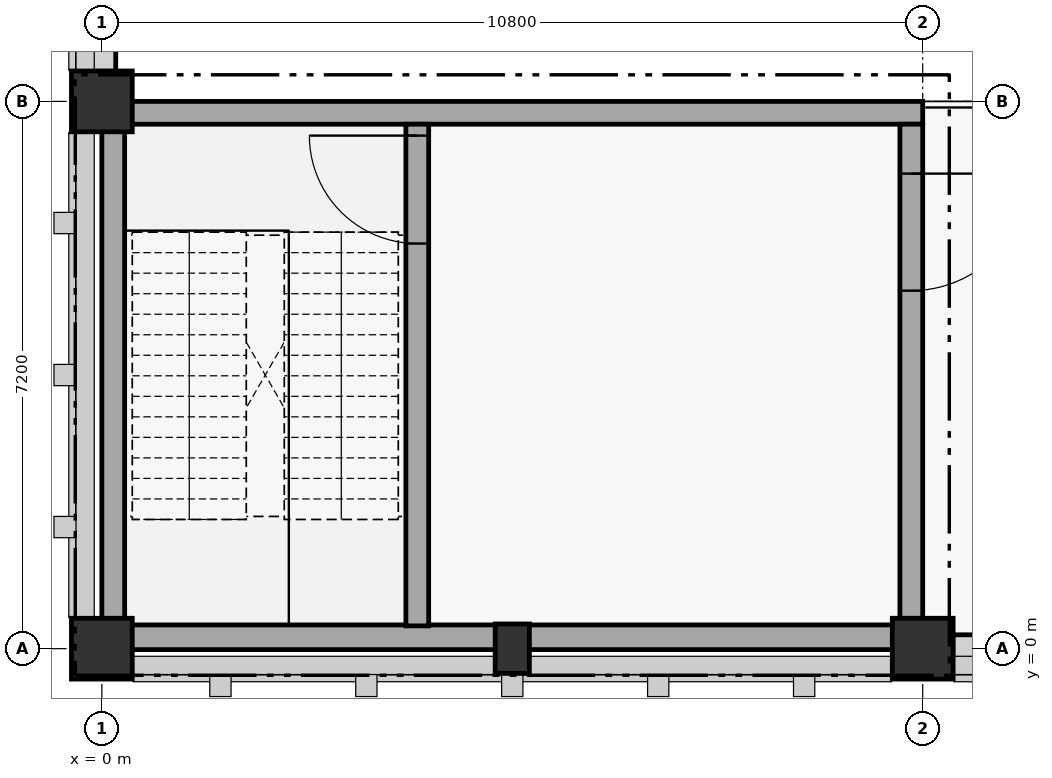
"""IFC4 building model, lengths in metres.
Left out: names, types, materials, properties, quantities, classifications, styles, units other than length and angle.
Written with IfcOpenShell. Run it as: python <this file> out.ifc"""

import sys

from ifc_helpers import new_model, si_unit, direction, frame, frame_2d, origin, origin_with_axes, origin_2d, place, context, subcontext, project, spatial, rectangle, extrude, element, fill, save


model = new_model("IFC4")
c1 = context("Model", 3, precision=1e-05, world=origin(), true_north=direction((0.0, 1.0)))
c2 = subcontext(c1, "Body", "Model", "MODEL_VIEW")
j1 = project(units=[si_unit("LENGTHUNIT", "METRE"), si_unit("PLANEANGLEUNIT", "RADIAN")], contexts=[c1])
p1 = place(None, origin())
s1 = spatial("IfcSite", under=j1, at=p1, CompositionType="ELEMENT")
p2 = place(p1, origin())
s2 = spatial("IfcBuilding", under=s1, at=p2, CompositionType="ELEMENT")
p3 = place(p2, frame((0.0, 0.0, 10.8)))
s3 = spatial("IfcBuildingStorey", under=s2, at=p3, CompositionType="ELEMENT", Elevation=10.8)
p4 = place(p3, origin_with_axes())
e1 = element("IfcColumn", 1, at=p4, inside=s3, PredefinedType="COLUMN", context=c2, shape_type="SweptSolid", body=[
    extrude(rectangle(XDim=0.8, YDim=0.8, at=origin_2d()), origin(), (0.0, 0.0, 1.0), 1.43),
])
for number, where, z_axis, x_axis in (
    (2, (0.0, 7.2, 0.0), (0.0, 0.0, 1.0), (1.0, 0.0, 0.0)),
    (3, (10.8, 0.0, 0.0), (0.0, 0.0, 1.0), (1.0, 0.0, 0.0)),
):
    element("IfcColumn", number, at=place(p3, frame(where, z_axis=z_axis, x_axis=x_axis)), inside=s3, PredefinedType="COLUMN", context=c2, shape_type="SweptSolid", body=[
        extrude(rectangle(XDim=0.8, YDim=0.8, at=origin_2d()), origin(), (0.0, 0.0, 1.0), 4.2),
    ])
p5 = place(p3, frame((5.4, 0.0, 0.0), z_axis=(0.0, 0.0, 1.0), x_axis=(1.0, 0.0, 0.0)))
e4 = element("IfcColumn", 4, at=p5, inside=s3, PredefinedType="PILASTER", context=c2, shape_type="SweptSolid", body=[
    extrude(rectangle(XDim=0.45, YDim=0.65, at=origin_2d()), origin(), (0.0, 0.0, 1.0), 2.72),
])
p6 = place(p3, frame((10.8, 0.15, 0.0), z_axis=(0.0, 0.0, 1.0), x_axis=(-1.0, 0.0, 0.0)))
e5 = element("IfcWall", 5, at=p6, inside=s3, PredefinedType="SHEAR", context=c2, shape_type="SweptSolid", body=[
    extrude(rectangle(XDim=10.8, YDim=0.325, at=frame_2d((5.4, 0.0))), origin(), (0.0, 0.0, 1.0), 4.2),
])
p7 = place(p3, frame((0.0, 7.05, 0.0), z_axis=(0.0, 0.0, 1.0), x_axis=(1.0, 0.0, 0.0)))
e6 = element("IfcWall", 6, at=p7, inside=s3, PredefinedType="SHEAR", context=c2, shape_type="SweptSolid", body=[
    extrude(rectangle(XDim=10.8, YDim=0.3, at=frame_2d((5.4, 0.0))), origin(), (0.0, 0.0, 1.0), 4.2),
])
p8 = place(p3, frame((0.15, 0.3, 0.0), z_axis=(0.0, 0.0, 1.0), x_axis=(0.0, 1.0, 0.0)))
e7 = element("IfcWall", 7, at=p8, inside=s3, PredefinedType="SHEAR", context=c2, shape_type="SweptSolid", body=[
    extrude(rectangle(XDim=6.6, YDim=0.3, at=frame_2d((3.3, 0.0))), origin(), (0.0, 0.0, 1.0), 4.2),
])
p9 = place(p3, frame((10.65, 6.9, 0.0), z_axis=(0.0, 0.0, 1.0), x_axis=(0.0, -1.0, 0.0)))
e8 = element("IfcWall", 8, at=p9, inside=s3, PredefinedType="SHEAR", context=c2, shape_type="SweptSolid", body=[
    extrude(rectangle(XDim=6.6, YDim=0.3, at=frame_2d((3.3, 0.0))), origin(), (0.0, 0.0, 1.0), 4.2),
])
p10 = place(p9, frame((0.65, 0.0, 0.0)))
e9 = element("IfcOpeningElement", 9, at=p10, cuts=e8, PredefinedType="OPENING", context=c2, shape_type="SweptSolid", body=[
    extrude(rectangle(XDim=1.54, YDim=2.22, at=frame_2d((0.77, 1.11))), frame((0.0, 0.15, 0.0), z_axis=(0.0, -1.0, 0.0), x_axis=(1.0, 0.0, 0.0)), (0.0, 0.0, 1.0), 0.3),
])
p11 = place(p3, frame((4.15, 0.3, 0.0), z_axis=(0.0, 0.0, 1.0), x_axis=(0.0, 1.0, 0.0)))
e10 = element("IfcWall", 10, at=p11, inside=s3, PredefinedType="SHEAR", context=c2, shape_type="SweptSolid", body=[
    extrude(rectangle(XDim=6.6, YDim=0.3, at=frame_2d((3.3, 0.0))), origin(), (0.0, 0.0, 1.0), 4.2),
])
p12 = place(p11, frame((5.03, 0.0, 0.0)))
e11 = element("IfcOpeningElement", 11, at=p12, cuts=e10, PredefinedType="OPENING", context=c2, shape_type="SweptSolid", body=[
    extrude(rectangle(XDim=1.42, YDim=2.2, at=frame_2d((0.71, 1.1))), frame((0.0, 0.15, 0.0), z_axis=(0.0, -1.0, 0.0), x_axis=(1.0, 0.0, 0.0)), (0.0, 0.0, 1.0), 0.3),
])
p13 = place(p3, frame((15.979, 0.0, -0.05), z_axis=(0.0, 0.0, 1.0), x_axis=(-1.0, 0.0, 0.0)))
e12 = element("IfcWall", 12, at=p13, inside=s3, PredefinedType="STANDARD", context=c2, shape_type="SweptSolid", body=[
    extrude(rectangle(XDim=4.783, YDim=0.365, at=frame_2d((2.392, 0.0))), origin(), (0.0, 0.0, 1.0), 3.647),
])
p14 = place(p13, frame((0.969, 0.0, 0.35)))
e13 = element("IfcOpeningElement", 13, at=p14, cuts=e12, PredefinedType="OPENING", context=c2, shape_type="SweptSolid", body=[
    extrude(rectangle(XDim=2.84, YDim=1.92, at=frame_2d((1.42, 0.96))), frame((0.0, 0.183, 0.0), z_axis=(0.0, -1.0, 0.0), x_axis=(1.0, 0.0, 0.0)), (0.0, 0.0, 1.0), 0.365),
])
p15 = place(p3, frame((0.0, 7.596, -0.05), z_axis=(0.0, 0.0, 1.0), x_axis=(0.0, 1.0, 0.0)))
e14 = element("IfcWall", 14, at=p15, inside=s3, PredefinedType="STANDARD", context=c2, shape_type="SweptSolid", body=[
    extrude(rectangle(XDim=10.008, YDim=0.365, at=frame_2d((5.004, 0.0))), origin(), (0.0, 0.0, 1.0), 4.857),
])
p16 = place(p12, origin())
e15 = element("IfcDoor", 15, at=p16, inside=s3, OperationType="SINGLE_SWING_RIGHT", PredefinedType="DOOR", context=c2, shape_type="SweptSolid", body=[
    extrude(rectangle(XDim=1.42, YDim=2.2, at=frame_2d((0.71, 1.1))), frame((0.0, 0.025, 0.0), z_axis=(0.0, -1.0, 0.0), x_axis=(1.0, 0.0, 0.0)), (0.0, 0.0, 1.0), 0.05),
])
fill(e11, e15)
p17 = place(p10, origin())
e16 = element("IfcDoor", 16, at=p17, inside=s3, OperationType="SINGLE_SWING_LEFT", PredefinedType="DOOR", context=c2, shape_type="SweptSolid", body=[
    extrude(rectangle(XDim=1.54, YDim=2.22, at=frame_2d((0.77, 1.11))), frame((0.0, 0.025, 0.0), z_axis=(0.0, -1.0, 0.0), x_axis=(1.0, 0.0, 0.0)), (0.0, 0.0, 1.0), 0.05),
])
fill(e9, e16)
save(model, sys.argv[1])
